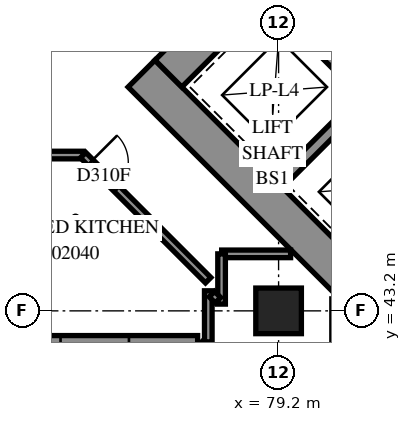
"""IFC4 building model, lengths in metres.
Left out: names, types, materials, properties, quantities, classifications, styles, units other than length and angle.
Written with IfcOpenShell. Run it as: python <this file> out.ifc"""

import sys

from ifc_helpers import new_model, si_unit, direction, frame, frame_2d, origin, origin_2d, place, context, subcontext, project, spatial, polyline, rectangle, outline, extrude, element, fill, save


model = new_model("IFC4")
c1 = context("Model", 3, precision=1e-05, world=origin(), true_north=direction((0.0, 1.0)))
c2 = subcontext(c1, "Body", "Model", "MODEL_VIEW")
j1 = project(units=[si_unit("LENGTHUNIT", "METRE"), si_unit("PLANEANGLEUNIT", "RADIAN")], contexts=[c1])
p1 = place(None, origin())
s1 = spatial("IfcSite", under=j1, at=p1, CompositionType="ELEMENT")
p2 = place(p1, origin())
s2 = spatial("IfcBuilding", under=s1, at=p2, CompositionType="ELEMENT")
p3 = place(p2, frame((0.0, 0.0, 10.2)))
s3 = spatial("IfcBuildingStorey", under=s2, at=p3, CompositionType="ELEMENT", Elevation=10.2)
p4 = place(p3, frame((79.2, 43.2, 0.0), z_axis=(0.0, 0.0, 1.0), x_axis=(1.0, 0.0, 0.0)))
e1 = element("IfcColumn", 1, at=p4, inside=s3, PredefinedType="COLUMN", context=c2, shape_type="SweptSolid", body=[
    extrude(rectangle(XDim=1.2, YDim=1.2, at=origin_2d()), origin(), (0.0, 0.0, 1.0), 3.8),
])
p5 = place(p3, frame((75.594, 49.443, -0.4), z_axis=(0.0, 0.0, 1.0), x_axis=(0.7071037324, -0.70710983, 0.0)))
e2 = element("IfcWall", 2, at=p5, inside=s3, PredefinedType="SHEAR", context=c2, shape_type="SweptSolid", body=[
    extrude(rectangle(XDim=16.4, YDim=1.0, at=frame_2d((8.2, 0.0))), origin(), (0.0, 0.0, 1.0), 3.5),
])
p6 = place(p3, frame((76.301, 49.443, -0.4), z_axis=(0.0, 0.0, 1.0), x_axis=(0.7071067812, 0.7071067812, 0.0)))
e3 = element("IfcWall", 3, at=p6, inside=s3, PredefinedType="SHEAR", context=c2, shape_type="SweptSolid", body=[
    extrude(rectangle(XDim=14.4, YDim=1.0, at=frame_2d((7.2, 0.0))), origin(), (0.0, 0.0, 1.0), 3.5),
])
p7 = place(p6, frame((4.55, 0.0, 0.4)))
e4 = element("IfcOpeningElement", 4, at=p7, cuts=e3, PredefinedType="OPENING", context=c2, shape_type="SweptSolid", body=[
    extrude(rectangle(XDim=1.1, YDim=2.1, at=frame_2d((0.55, 1.05))), frame((0.0, 0.51, 0.0), z_axis=(0.0, -1.0, 0.0), x_axis=(1.0, 0.0, 0.0)), (0.0, 0.0, 1.0), 1.02),
])
p8 = place(p6, frame((11.35, 0.0, 0.4)))
e5 = element("IfcOpeningElement", 5, at=p8, cuts=e3, PredefinedType="OPENING", context=c2, shape_type="SweptSolid", body=[
    extrude(rectangle(XDim=1.1, YDim=2.1, at=frame_2d((0.55, 1.05))), frame((0.0, 0.51, 0.0), z_axis=(0.0, -1.0, 0.0), x_axis=(1.0, 0.0, 0.0)), (0.0, 0.0, 1.0), 1.02),
])
p9 = place(p3, frame((79.2, 46.544, 0.0), z_axis=(0.0, 0.0, 1.0), x_axis=(0.7071219326, 0.7070916295, 0.0)))
e6 = element("IfcWall", 6, at=p9, inside=s3, PredefinedType="SOLIDWALL", context=c2, shape_type="SweptSolid", body=[
    extrude(rectangle(XDim=3.3, YDim=0.3, at=frame_2d((1.65, 0.0))), origin(), (0.0, 0.0, 1.0), 3.8),
])
p10 = place(p3, frame((78.988, 51.423, 0.0), z_axis=(0.0, 0.0, 1.0), x_axis=(0.7071067812, -0.7071067812, 0.0)))
e7 = element("IfcWall", 7, at=p10, inside=s3, PredefinedType="SOLIDWALL", context=c2, shape_type="SweptSolid", body=[
    extrude(rectangle(XDim=14.4, YDim=0.3, at=frame_2d((7.2, 0.0))), origin(), (0.0, 0.0, 1.0), 3.8),
])
p11 = place(p10, frame((1.25, 0.0, 0.0)))
e8 = element("IfcOpeningElement", 8, at=p11, cuts=e7, PredefinedType="OPENING", context=c2, shape_type="SweptSolid", body=[
    extrude(rectangle(XDim=1.1, YDim=2.1, at=frame_2d((0.55, 1.05))), frame((0.0, 0.16, 0.0), z_axis=(0.0, -1.0, 0.0), x_axis=(1.0, 0.0, 0.0)), (0.0, 0.0, 1.0), 0.32),
])
p12 = place(p10, frame((4.85, 0.0, 0.0)))
e9 = element("IfcOpeningElement", 9, at=p12, cuts=e7, PredefinedType="OPENING", context=c2, shape_type="SweptSolid", body=[
    extrude(rectangle(XDim=1.1, YDim=2.1, at=frame_2d((0.55, 1.05))), frame((0.0, 0.16, 0.0), z_axis=(0.0, -1.0, 0.0), x_axis=(1.0, 0.0, 0.0)), (0.0, 0.0, 1.0), 0.32),
])
p13 = place(p10, frame((8.45, 0.0, 0.0)))
e10 = element("IfcOpeningElement", 10, at=p13, cuts=e7, PredefinedType="OPENING", context=c2, shape_type="SweptSolid", body=[
    extrude(rectangle(XDim=1.1, YDim=2.1, at=frame_2d((0.55, 1.05))), frame((0.0, 0.16, 0.0), z_axis=(0.0, -1.0, 0.0), x_axis=(1.0, 0.0, 0.0)), (0.0, 0.0, 1.0), 0.32),
])
p14 = place(p10, frame((12.05, 0.0, 0.0)))
e11 = element("IfcOpeningElement", 11, at=p14, cuts=e7, PredefinedType="OPENING", context=c2, shape_type="SweptSolid", body=[
    extrude(rectangle(XDim=1.1, YDim=2.1, at=frame_2d((0.55, 1.05))), frame((0.0, 0.16, 0.0), z_axis=(0.0, -1.0, 0.0), x_axis=(1.0, 0.0, 0.0)), (0.0, 0.0, 1.0), 0.32),
])
p15 = place(p3, frame((117.843, 34.665, 0.0), z_axis=(0.0, 0.0, 1.0), x_axis=(-0.7071067812, 0.7071067812, 0.0)))
e12 = element("IfcWall", 12, at=p15, inside=s3, PredefinedType="SOLIDWALL", context=c2, shape_type="SweptSolid", body=[
    extrude(outline(polyline([(-0.275, -0.275), (54.222, -0.275), (53.994, 0.275), (0.275, 0.275), (-0.275, -0.275)])), origin(), (0.0, 0.0, 1.0), 3.8),
])
p16 = place(p15, frame((0.8, 0.0, 0.7)))
e13 = element("IfcOpeningElement", 13, at=p16, cuts=e12, PredefinedType="OPENING", context=c2, shape_type="SweptSolid", body=[
    extrude(rectangle(XDim=1.8, YDim=2.6, at=frame_2d((0.9, 1.3))), frame((0.0, 0.285, 0.0), z_axis=(0.0, -1.0, 0.0), x_axis=(1.0, 0.0, 0.0)), (0.0, 0.0, 1.0), 0.57),
])
p17 = place(p15, frame((4.225, 0.0, 0.7)))
e14 = element("IfcOpeningElement", 14, at=p17, cuts=e12, PredefinedType="OPENING", context=c2, shape_type="SweptSolid", body=[
    extrude(rectangle(XDim=1.8, YDim=2.6, at=frame_2d((0.9, 1.3))), frame((0.0, 0.285, 0.0), z_axis=(0.0, -1.0, 0.0), x_axis=(1.0, 0.0, 0.0)), (0.0, 0.0, 1.0), 0.57),
])
p18 = place(p15, frame((7.825, 0.0, 0.7)))
e15 = element("IfcOpeningElement", 15, at=p18, cuts=e12, PredefinedType="OPENING", context=c2, shape_type="SweptSolid", body=[
    extrude(rectangle(XDim=1.8, YDim=2.6, at=frame_2d((0.9, 1.3))), frame((0.0, 0.285, 0.0), z_axis=(0.0, -1.0, 0.0), x_axis=(1.0, 0.0, 0.0)), (0.0, 0.0, 1.0), 0.57),
])
p19 = place(p15, frame((11.425, 0.0, 0.7)))
e16 = element("IfcOpeningElement", 16, at=p19, cuts=e12, PredefinedType="OPENING", context=c2, shape_type="SweptSolid", body=[
    extrude(rectangle(XDim=1.8, YDim=2.6, at=frame_2d((0.9, 1.3))), frame((0.0, 0.285, 0.0), z_axis=(0.0, -1.0, 0.0), x_axis=(1.0, 0.0, 0.0)), (0.0, 0.0, 1.0), 0.57),
])
p20 = place(p15, frame((15.025, 0.0, 0.7)))
e17 = element("IfcOpeningElement", 17, at=p20, cuts=e12, PredefinedType="OPENING", context=c2, shape_type="SweptSolid", body=[
    extrude(rectangle(XDim=1.8, YDim=2.6, at=frame_2d((0.9, 1.3))), frame((0.0, 0.285, 0.0), z_axis=(0.0, -1.0, 0.0), x_axis=(1.0, 0.0, 0.0)), (0.0, 0.0, 1.0), 0.57),
])
p21 = place(p15, frame((18.625, 0.0, 0.7)))
e18 = element("IfcOpeningElement", 18, at=p21, cuts=e12, PredefinedType="OPENING", context=c2, shape_type="SweptSolid", body=[
    extrude(rectangle(XDim=1.8, YDim=2.6, at=frame_2d((0.9, 1.3))), frame((0.0, 0.285, 0.0), z_axis=(0.0, -1.0, 0.0), x_axis=(1.0, 0.0, 0.0)), (0.0, 0.0, 1.0), 0.57),
])
p22 = place(p15, frame((22.225, 0.0, 0.7)))
e19 = element("IfcOpeningElement", 19, at=p22, cuts=e12, PredefinedType="OPENING", context=c2, shape_type="SweptSolid", body=[
    extrude(rectangle(XDim=1.8, YDim=2.6, at=frame_2d((0.9, 1.3))), frame((0.0, 0.285, 0.0), z_axis=(0.0, -1.0, 0.0), x_axis=(1.0, 0.0, 0.0)), (0.0, 0.0, 1.0), 0.57),
])
p23 = place(p15, frame((25.825, 0.0, 0.7)))
e20 = element("IfcOpeningElement", 20, at=p23, cuts=e12, PredefinedType="OPENING", context=c2, shape_type="SweptSolid", body=[
    extrude(rectangle(XDim=1.8, YDim=2.6, at=frame_2d((0.9, 1.3))), frame((0.0, 0.285, 0.0), z_axis=(0.0, -1.0, 0.0), x_axis=(1.0, 0.0, 0.0)), (0.0, 0.0, 1.0), 0.57),
])
p24 = place(p15, frame((29.425, 0.0, 0.7)))
e21 = element("IfcOpeningElement", 21, at=p24, cuts=e12, PredefinedType="OPENING", context=c2, shape_type="SweptSolid", body=[
    extrude(rectangle(XDim=1.8, YDim=2.6, at=frame_2d((0.9, 1.3))), frame((0.0, 0.285, 0.0), z_axis=(0.0, -1.0, 0.0), x_axis=(1.0, 0.0, 0.0)), (0.0, 0.0, 1.0), 0.57),
])
p25 = place(p15, frame((33.025, 0.0, 0.7)))
e22 = element("IfcOpeningElement", 22, at=p25, cuts=e12, PredefinedType="OPENING", context=c2, shape_type="SweptSolid", body=[
    extrude(rectangle(XDim=1.8, YDim=2.6, at=frame_2d((0.9, 1.3))), frame((0.0, 0.285, 0.0), z_axis=(0.0, -1.0, 0.0), x_axis=(1.0, 0.0, 0.0)), (0.0, 0.0, 1.0), 0.57),
])
p26 = place(p15, frame((36.625, 0.0, 0.7)))
e23 = element("IfcOpeningElement", 23, at=p26, cuts=e12, PredefinedType="OPENING", context=c2, shape_type="SweptSolid", body=[
    extrude(rectangle(XDim=1.8, YDim=2.6, at=frame_2d((0.9, 1.3))), frame((0.0, 0.285, 0.0), z_axis=(0.0, -1.0, 0.0), x_axis=(1.0, 0.0, 0.0)), (0.0, 0.0, 1.0), 0.57),
])
p27 = place(p15, frame((40.225, 0.0, 0.7)))
e24 = element("IfcOpeningElement", 24, at=p27, cuts=e12, PredefinedType="OPENING", context=c2, shape_type="SweptSolid", body=[
    extrude(rectangle(XDim=1.8, YDim=2.6, at=frame_2d((0.9, 1.3))), frame((0.0, 0.285, 0.0), z_axis=(0.0, -1.0, 0.0), x_axis=(1.0, 0.0, 0.0)), (0.0, 0.0, 1.0), 0.57),
])
p28 = place(p15, frame((43.825, 0.0, 0.7)))
e25 = element("IfcOpeningElement", 25, at=p28, cuts=e12, PredefinedType="OPENING", context=c2, shape_type="SweptSolid", body=[
    extrude(rectangle(XDim=1.8, YDim=2.6, at=frame_2d((0.9, 1.3))), frame((0.0, 0.285, 0.0), z_axis=(0.0, -1.0, 0.0), x_axis=(1.0, 0.0, 0.0)), (0.0, 0.0, 1.0), 0.57),
])
p29 = place(p15, frame((47.425, 0.0, 0.7)))
e26 = element("IfcOpeningElement", 26, at=p29, cuts=e12, PredefinedType="OPENING", context=c2, shape_type="SweptSolid", body=[
    extrude(rectangle(XDim=1.8, YDim=2.6, at=frame_2d((0.9, 1.3))), frame((0.0, 0.285, 0.0), z_axis=(0.0, -1.0, 0.0), x_axis=(1.0, 0.0, 0.0)), (0.0, 0.0, 1.0), 0.57),
])
p30 = place(p15, frame((50.96, 0.0, 0.7)))
e27 = element("IfcOpeningElement", 27, at=p30, cuts=e12, PredefinedType="OPENING", context=c2, shape_type="SweptSolid", body=[
    extrude(rectangle(XDim=1.8, YDim=2.6, at=frame_2d((0.9, 1.3))), frame((0.0, 0.285, 0.0), z_axis=(0.0, -1.0, 0.0), x_axis=(1.0, 0.0, 0.0)), (0.0, 0.0, 1.0), 0.57),
])
p31 = place(p3, frame((72.925, 42.275, 0.0), z_axis=(0.0, 0.0, 1.0), x_axis=(1.0, 0.0, 0.0)))
e28 = element("IfcWall", 28, at=p31, inside=s3, PredefinedType="SOLIDWALL", context=c2, shape_type="SweptSolid", body=[
    extrude(outline(polyline([(0.275, -0.275), (4.031, -0.275), (4.259, 0.275), (-0.275, 0.275), (0.275, -0.275)])), origin(), (0.0, 0.0, 1.0), 3.8),
])
p32 = place(p31, frame((0.537, 0.0, 0.7)))
e29 = element("IfcOpeningElement", 29, at=p32, cuts=e28, PredefinedType="OPENING", context=c2, shape_type="SweptSolid", body=[
    extrude(rectangle(XDim=1.8, YDim=2.6, at=frame_2d((0.9, 1.3))), frame((0.0, 0.285, 0.0), z_axis=(0.0, -1.0, 0.0), x_axis=(1.0, 0.0, 0.0)), (0.0, 0.0, 1.0), 0.57),
])
p33 = place(p3, frame((77.07, 42.275, 0.0), z_axis=(0.0, 0.0, 1.0), x_axis=(0.7071067812, -0.7071067812, 0.0)))
e30 = element("IfcWall", 30, at=p33, inside=s3, PredefinedType="SOLIDWALL", context=c2, shape_type="SweptSolid", body=[
    extrude(outline(polyline([(0.114, -0.275), (39.288, -0.275), (38.737, 0.275), (-0.114, 0.275), (0.114, -0.275)])), origin(), (0.0, 0.0, 1.0), 3.8),
])
p34 = place(p33, frame((2.837, 0.0, 0.7)))
e31 = element("IfcOpeningElement", 31, at=p34, cuts=e30, PredefinedType="OPENING", context=c2, shape_type="SweptSolid", body=[
    extrude(rectangle(XDim=1.8, YDim=2.6, at=frame_2d((0.9, 1.3))), frame((0.0, 0.285, 0.0), z_axis=(0.0, -1.0, 0.0), x_axis=(1.0, 0.0, 0.0)), (0.0, 0.0, 1.0), 0.57),
])
p35 = place(p33, frame((6.588, 0.0, 0.7)))
e32 = element("IfcOpeningElement", 32, at=p35, cuts=e30, PredefinedType="OPENING", context=c2, shape_type="SweptSolid", body=[
    extrude(rectangle(XDim=1.8, YDim=2.6, at=frame_2d((0.9, 1.3))), frame((0.0, 0.285, 0.0), z_axis=(0.0, -1.0, 0.0), x_axis=(1.0, 0.0, 0.0)), (0.0, 0.0, 1.0), 0.57),
])
p36 = place(p33, frame((10.188, 0.0, 0.7)))
e33 = element("IfcOpeningElement", 33, at=p36, cuts=e30, PredefinedType="OPENING", context=c2, shape_type="SweptSolid", body=[
    extrude(rectangle(XDim=1.8, YDim=2.6, at=frame_2d((0.9, 1.3))), frame((0.0, 0.285, 0.0), z_axis=(0.0, -1.0, 0.0), x_axis=(1.0, 0.0, 0.0)), (0.0, 0.0, 1.0), 0.57),
])
p37 = place(p33, frame((13.787, 0.0, 0.7)))
e34 = element("IfcOpeningElement", 34, at=p37, cuts=e30, PredefinedType="OPENING", context=c2, shape_type="SweptSolid", body=[
    extrude(rectangle(XDim=1.8, YDim=2.6, at=frame_2d((0.9, 1.3))), frame((0.0, 0.285, 0.0), z_axis=(0.0, -1.0, 0.0), x_axis=(1.0, 0.0, 0.0)), (0.0, 0.0, 1.0), 0.57),
])
p38 = place(p33, frame((17.387, 0.0, 0.7)))
e35 = element("IfcOpeningElement", 35, at=p38, cuts=e30, PredefinedType="OPENING", context=c2, shape_type="SweptSolid", body=[
    extrude(rectangle(XDim=1.8, YDim=2.6, at=frame_2d((0.9, 1.3))), frame((0.0, 0.285, 0.0), z_axis=(0.0, -1.0, 0.0), x_axis=(1.0, 0.0, 0.0)), (0.0, 0.0, 1.0), 0.57),
])
p39 = place(p33, frame((20.988, 0.0, 0.7)))
e36 = element("IfcOpeningElement", 36, at=p39, cuts=e30, PredefinedType="OPENING", context=c2, shape_type="SweptSolid", body=[
    extrude(rectangle(XDim=1.8, YDim=2.6, at=frame_2d((0.9, 1.3))), frame((0.0, 0.285, 0.0), z_axis=(0.0, -1.0, 0.0), x_axis=(1.0, 0.0, 0.0)), (0.0, 0.0, 1.0), 0.57),
])
p40 = place(p33, frame((24.587, 0.0, 0.7)))
e37 = element("IfcOpeningElement", 37, at=p40, cuts=e30, PredefinedType="OPENING", context=c2, shape_type="SweptSolid", body=[
    extrude(rectangle(XDim=1.8, YDim=2.6, at=frame_2d((0.9, 1.3))), frame((0.0, 0.285, 0.0), z_axis=(0.0, -1.0, 0.0), x_axis=(1.0, 0.0, 0.0)), (0.0, 0.0, 1.0), 0.57),
])
p41 = place(p33, frame((28.188, 0.0, 0.7)))
e38 = element("IfcOpeningElement", 38, at=p41, cuts=e30, PredefinedType="OPENING", context=c2, shape_type="SweptSolid", body=[
    extrude(rectangle(XDim=1.8, YDim=2.6, at=frame_2d((0.9, 1.3))), frame((0.0, 0.285, 0.0), z_axis=(0.0, -1.0, 0.0), x_axis=(1.0, 0.0, 0.0)), (0.0, 0.0, 1.0), 0.57),
])
p42 = place(p33, frame((31.788, 0.0, 0.7)))
e39 = element("IfcOpeningElement", 39, at=p42, cuts=e30, PredefinedType="OPENING", context=c2, shape_type="SweptSolid", body=[
    extrude(rectangle(XDim=1.8, YDim=2.6, at=frame_2d((0.9, 1.3))), frame((0.0, 0.285, 0.0), z_axis=(0.0, -1.0, 0.0), x_axis=(1.0, 0.0, 0.0)), (0.0, 0.0, 1.0), 0.57),
])
p43 = place(p33, frame((35.388, 0.0, 0.7)))
e40 = element("IfcOpeningElement", 40, at=p43, cuts=e30, PredefinedType="OPENING", context=c2, shape_type="SweptSolid", body=[
    extrude(rectangle(XDim=1.8, YDim=2.6, at=frame_2d((0.9, 1.3))), frame((0.0, 0.285, 0.0), z_axis=(0.0, -1.0, 0.0), x_axis=(1.0, 0.0, 0.0)), (0.0, 0.0, 1.0), 0.57),
])
p44 = place(p3, frame((54.5, 47.3, 0.0), z_axis=(0.0, 0.0, 1.0), x_axis=(1.0, 0.0, 0.0)))
e41 = element("IfcWall", 41, at=p44, inside=s3, PredefinedType="PARTITIONING", context=c2, shape_type="SweptSolid", body=[
    extrude(rectangle(XDim=19.56, YDim=0.2, at=frame_2d((9.78, 0.0))), origin(), (0.0, 0.0, 1.0), 3.8),
])
p45 = place(p44, frame((0.252, 0.0, 0.0)))
e42 = element("IfcOpeningElement", 42, at=p45, cuts=e41, PredefinedType="OPENING", context=c2, shape_type="SweptSolid", body=[
    extrude(rectangle(XDim=1.0, YDim=2.1, at=frame_2d((0.5, 1.05))), frame((0.0, 0.11, 0.0), z_axis=(0.0, -1.0, 0.0), x_axis=(1.0, 0.0, 0.0)), (0.0, 0.0, 1.0), 0.22),
])
p46 = place(p44, frame((4.865, 0.0, 0.0)))
e43 = element("IfcOpeningElement", 43, at=p46, cuts=e41, PredefinedType="OPENING", context=c2, shape_type="SweptSolid", body=[
    extrude(rectangle(XDim=1.0, YDim=2.1, at=frame_2d((0.5, 1.05))), frame((0.0, 0.11, 0.0), z_axis=(0.0, -1.0, 0.0), x_axis=(1.0, 0.0, 0.0)), (0.0, 0.0, 1.0), 0.22),
])
p47 = place(p44, frame((7.225, 0.0, 0.0)))
e44 = element("IfcOpeningElement", 44, at=p47, cuts=e41, PredefinedType="OPENING", context=c2, shape_type="SweptSolid", body=[
    extrude(rectangle(XDim=1.0, YDim=2.1, at=frame_2d((0.5, 1.05))), frame((0.0, 0.11, 0.0), z_axis=(0.0, -1.0, 0.0), x_axis=(1.0, 0.0, 0.0)), (0.0, 0.0, 1.0), 0.22),
])
p48 = place(p44, frame((12.065, 0.0, 0.0)))
e45 = element("IfcOpeningElement", 45, at=p48, cuts=e41, PredefinedType="OPENING", context=c2, shape_type="SweptSolid", body=[
    extrude(rectangle(XDim=1.0, YDim=2.1, at=frame_2d((0.5, 1.05))), frame((0.0, 0.11, 0.0), z_axis=(0.0, -1.0, 0.0), x_axis=(1.0, 0.0, 0.0)), (0.0, 0.0, 1.0), 0.22),
])
p49 = place(p44, frame((14.425, 0.0, 0.0)))
e46 = element("IfcOpeningElement", 46, at=p49, cuts=e41, PredefinedType="OPENING", context=c2, shape_type="SweptSolid", body=[
    extrude(rectangle(XDim=1.0, YDim=2.1, at=frame_2d((0.5, 1.05))), frame((0.0, 0.11, 0.0), z_axis=(0.0, -1.0, 0.0), x_axis=(1.0, 0.0, 0.0)), (0.0, 0.0, 1.0), 0.22),
])
p50 = place(p3, frame((74.057, 47.297, 0.0), z_axis=(0.0, 0.0, 1.0), x_axis=(0.7071067812, -0.7071067812, 0.0)))
e47 = element("IfcWall", 47, at=p50, inside=s3, PredefinedType="PARTITIONING", context=c2, shape_type="SweptSolid", body=[
    extrude(rectangle(XDim=4.653, YDim=0.2, at=frame_2d((2.326, 0.0))), origin(), (0.0, 0.0, 1.0), 3.8),
])
p51 = place(p50, frame((0.267, 0.0, 0.0)))
e48 = element("IfcOpeningElement", 48, at=p51, cuts=e47, PredefinedType="OPENING", context=c2, shape_type="SweptSolid", body=[
    extrude(rectangle(XDim=1.0, YDim=2.1, at=frame_2d((0.5, 1.05))), frame((0.0, 0.11, 0.0), z_axis=(0.0, -1.0, 0.0), x_axis=(1.0, 0.0, 0.0)), (0.0, 0.0, 1.0), 0.22),
])
for number, where, z_axis, x_axis in (
    (49, (77.702, 44.7, 0.0), (0.0, 0.0, 1.0), (1.0, 0.0, 0.0)),
    (50, (80.7, 41.702, 0.0), (0.0, 0.0, 1.0), (0.0, 1.0, 0.0)),
):
    element("IfcWall", number, at=place(p3, frame(where, z_axis=z_axis, x_axis=x_axis)), inside=s3, PredefinedType="PARTITIONING", context=c2, shape_type="SweptSolid", body=[
        extrude(rectangle(XDim=1.814, YDim=0.2, at=frame_2d((0.907, 0.0))), origin(), (0.0, 0.0, 1.0), 3.8),
    ])
p52 = place(p3, frame((77.7, 43.378, 0.0), z_axis=(0.0, 0.0, 1.0), x_axis=(0.0, 1.0, 0.0)))
e51 = element("IfcWall", 51, at=p52, inside=s3, PredefinedType="PARTITIONING", context=c2, shape_type="SweptSolid", body=[
    extrude(rectangle(XDim=1.322, YDim=0.2, at=frame_2d((0.661, 0.0))), origin(), (0.0, 0.0, 1.0), 3.8),
])
p53 = place(p3, frame((77.35, 42.384, 0.0), z_axis=(0.0, 0.0, 1.0), x_axis=(0.0, 1.0, 0.0)))
e52 = element("IfcWall", 52, at=p53, inside=s3, PredefinedType="PARTITIONING", context=c2, shape_type="SweptSolid", body=[
    extrude(rectangle(XDim=1.344, YDim=0.2, at=frame_2d((0.672, 0.0))), origin(), (0.0, 0.0, 1.0), 3.8),
])
p54 = place(p3, frame((77.445, 43.64, 0.0), z_axis=(0.0, 0.0, 1.0), x_axis=(0.7071067812, -0.7071067812, 0.0)))
e53 = element("IfcWall", 53, at=p54, inside=s3, PredefinedType="PARTITIONING", context=c2, shape_type="SweptSolid", body=[
    extrude(rectangle(XDim=0.225, YDim=0.2, at=frame_2d((0.113, 0.0))), origin(), (0.0, 0.0, 1.0), 3.8),
])
p55 = place(p32, origin())
e54 = element("IfcWindow", 54, at=p55, inside=s3, PartitioningType="SINGLE_PANEL", PredefinedType="WINDOW", context=c2, shape_type="SweptSolid", body=[
    extrude(rectangle(XDim=1.8, YDim=2.6, at=frame_2d((0.9, 1.3))), frame((0.0, 0.155, 0.0), z_axis=(0.0, -1.0, 0.0), x_axis=(1.0, 0.0, 0.0)), (0.0, 0.0, 1.0), 0.06),
])
fill(e29, e54)
p56 = place(p11, origin())
e55 = element("IfcDoor", 55, at=p56, inside=s3, OperationType="SLIDING_TO_LEFT", PredefinedType="DOOR", context=c2, shape_type="SweptSolid", body=[
    extrude(rectangle(XDim=1.1, YDim=2.1, at=frame_2d((0.55, 1.05))), frame((0.0, 0.025, 0.0), z_axis=(0.0, -1.0, 0.0), x_axis=(1.0, 0.0, 0.0)), (0.0, 0.0, 1.0), 0.05),
])
fill(e8, e55)
p57 = place(p51, origin())
e56 = element("IfcDoor", 56, at=p57, inside=s3, OperationType="SINGLE_SWING_LEFT", PredefinedType="DOOR", context=c2, shape_type="SweptSolid", body=[
    extrude(rectangle(XDim=1.0, YDim=2.1, at=frame_2d((0.5, 1.05))), frame((0.0, 0.025, 0.0), z_axis=(0.0, -1.0, 0.0), x_axis=(1.0, 0.0, 0.0)), (0.0, 0.0, 1.0), 0.05),
])
fill(e48, e56)
save(model, sys.argv[1])
